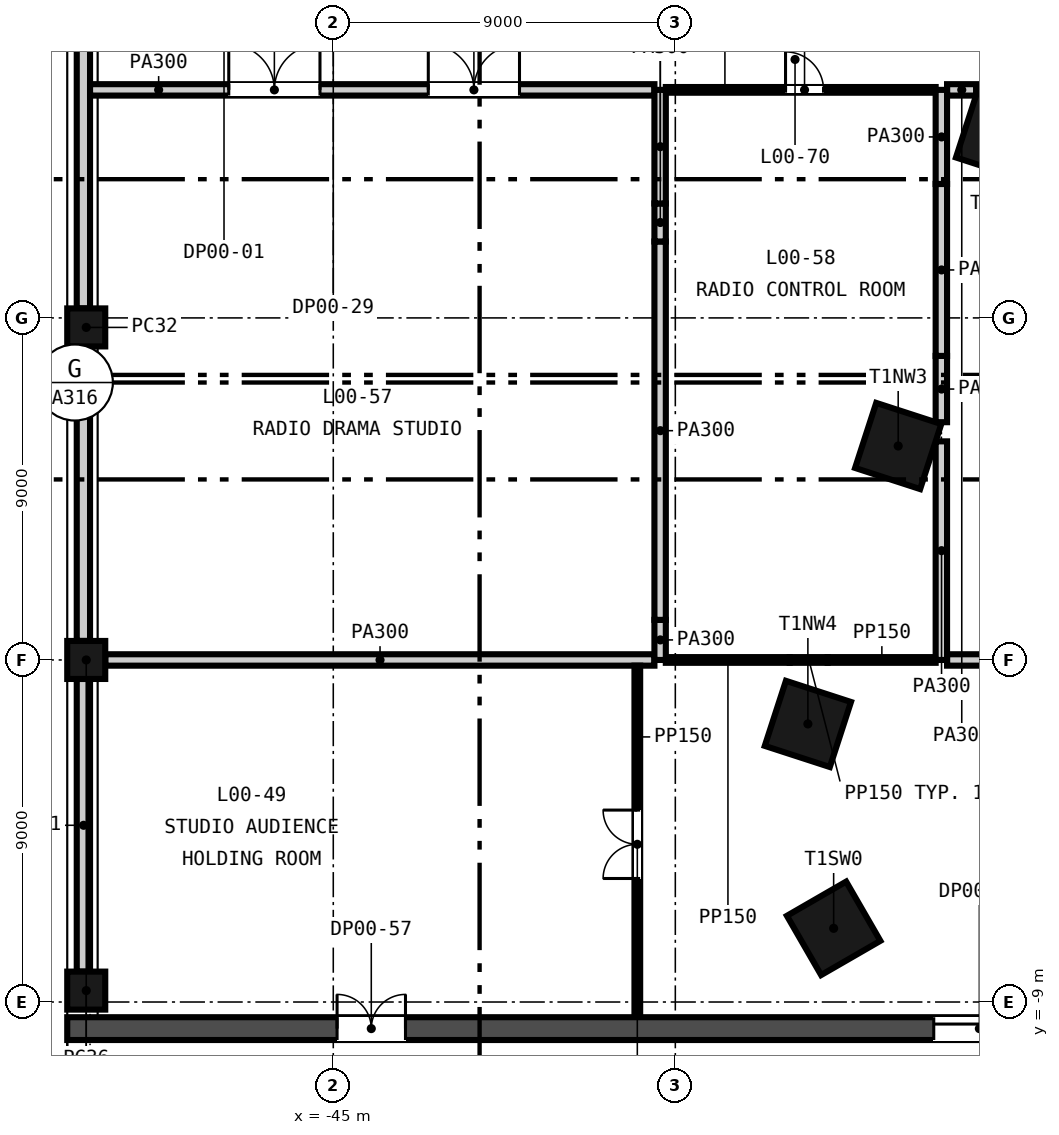
"""IFC4 building model, lengths in metres.
Left out: names, types, materials, properties, quantities, classifications, styles, units other than length and angle.
Written with IfcOpenShell. Run it as: python <this file> out.ifc"""

import sys

from ifc_helpers import new_model, si_unit, direction, frame, frame_2d, origin, origin_2d, place, context, subcontext, project, spatial, rectangle, extrude, element, fill, save


model = new_model("IFC4")
c1 = context("Model", 3, precision=1e-05, world=origin(), true_north=direction((0.0, 1.0)))
c2 = subcontext(c1, "Body", "Model", "MODEL_VIEW")
j1 = project(units=[si_unit("LENGTHUNIT", "METRE"), si_unit("PLANEANGLEUNIT", "RADIAN")], contexts=[c1])
p1 = place(None, origin())
s1 = spatial("IfcSite", under=j1, at=p1, CompositionType="ELEMENT")
p2 = place(p1, origin())
s2 = spatial("IfcBuilding", under=s1, at=p2, CompositionType="ELEMENT")
p3 = place(p2, origin())
s3 = spatial("IfcBuildingStorey", under=s2, at=p3, CompositionType="ELEMENT", Elevation=0.0)
for number, where, z_axis, x_axis in (
    (1, (-27.482, 13.799, -0.3), (0.0, 0.0, 1.0), (-0.309, -0.951, 0.0)),
    (2, (-30.136, 5.63, -0.3), (0.0, 0.0, 1.0), (-0.309, -0.951, 0.0)),
    (3, (-32.512, -1.683, -0.3), (0.0, 0.0, 1.0), (-0.309, -0.951, 0.0)),
    (4, (-31.834, -7.061, -0.3), (0.0, 0.0, 1.0), (0.5, -0.866, 0.0)),
):
    element("IfcColumn", number, at=place(p3, frame(where, z_axis=z_axis, x_axis=x_axis)), inside=s3, PredefinedType="COLUMN", context=c2, shape_type="SweptSolid", body=[
        extrude(rectangle(XDim=1.8, YDim=1.8, at=origin_2d()), origin(), (0.0, 0.0, 1.0), 8.9),
    ])
for number, where, z_axis, x_axis in (
    (5, (-51.5, 8.75, -0.3), (0.0, 0.0, 1.0), (0.0, -1.0, 0.0)),
    (6, (-51.5, 0.0, -0.3), (0.0, 0.0, 1.0), (0.0, -1.0, 0.0)),
    (7, (-51.5, -8.7, -0.3), (0.0, 0.0, 1.0), (0.0, 1.0, 0.0)),
):
    element("IfcColumn", number, at=place(p3, frame(where, z_axis=z_axis, x_axis=x_axis)), inside=s3, PredefinedType="COLUMN", context=c2, shape_type="SweptSolid", body=[
        extrude(rectangle(XDim=1.0, YDim=1.0, at=origin_2d()), origin(), (0.0, 0.0, 1.0), 8.9),
    ])
p4 = place(p3, frame((-52.0, -9.7, -0.3), z_axis=(0.0, 0.0, 1.0), x_axis=(1.0, 0.0, 0.0)))
e8 = element("IfcWall", 8, at=p4, inside=s3, PredefinedType="SOLIDWALL", context=c2, shape_type="SweptSolid", body=[
    extrude(rectangle(XDim=104.0, YDim=0.6, at=frame_2d((52.0, 0.0))), origin(), (0.0, 0.0, 1.0), 8.9),
])
p5 = place(p4, frame((67.4, 0.0, 0.3)))
e9 = element("IfcOpeningElement", 9, at=p5, cuts=e8, PredefinedType="OPENING", context=c2, shape_type="SweptSolid", body=[
    extrude(rectangle(XDim=1.2, YDim=2.1, at=frame_2d((0.6, 1.05))), frame((0.0, 0.31, 0.0), z_axis=(0.0, -1.0, 0.0), x_axis=(1.0, 0.0, 0.0)), (0.0, 0.0, 1.0), 0.62),
])
p6 = place(p4, frame((38.2, 0.0, 0.3)))
e10 = element("IfcOpeningElement", 10, at=p6, cuts=e8, PredefinedType="OPENING", context=c2, shape_type="SweptSolid", body=[
    extrude(rectangle(XDim=1.8, YDim=2.4, at=frame_2d((0.9, 1.2))), frame((0.0, 0.31, 0.0), z_axis=(0.0, -1.0, 0.0), x_axis=(1.0, 0.0, 0.0)), (0.0, 0.0, 1.0), 0.62),
])
p7 = place(p4, frame((64.0, 0.0, 0.3)))
e11 = element("IfcOpeningElement", 11, at=p7, cuts=e8, PredefinedType="OPENING", context=c2, shape_type="SweptSolid", body=[
    extrude(rectangle(XDim=1.8, YDim=2.4, at=frame_2d((0.9, 1.2))), frame((0.0, 0.31, 0.0), z_axis=(0.0, -1.0, 0.0), x_axis=(1.0, 0.0, 0.0)), (0.0, 0.0, 1.0), 0.62),
])
p8 = place(p4, frame((41.8, 0.0, 0.3)))
e12 = element("IfcOpeningElement", 12, at=p8, cuts=e8, PredefinedType="OPENING", context=c2, shape_type="SweptSolid", body=[
    extrude(rectangle(XDim=2.4, YDim=2.4, at=frame_2d((1.2, 1.2))), frame((0.0, 0.31, 0.0), z_axis=(0.0, -1.0, 0.0), x_axis=(1.0, 0.0, 0.0)), (0.0, 0.0, 1.0), 0.62),
])
p9 = place(p4, frame((59.8, 0.0, 0.3)))
e13 = element("IfcOpeningElement", 13, at=p9, cuts=e8, PredefinedType="OPENING", context=c2, shape_type="SweptSolid", body=[
    extrude(rectangle(XDim=2.4, YDim=2.4, at=frame_2d((1.2, 1.2))), frame((0.0, 0.31, 0.0), z_axis=(0.0, -1.0, 0.0), x_axis=(1.0, 0.0, 0.0)), (0.0, 0.0, 1.0), 0.62),
])
p10 = place(p4, frame((22.8, 0.0, 0.3)))
e14 = element("IfcOpeningElement", 14, at=p10, cuts=e8, PredefinedType="OPENING", context=c2, shape_type="SweptSolid", body=[
    extrude(rectangle(XDim=2.4, YDim=2.4, at=frame_2d((1.2, 1.2))), frame((0.0, 0.31, 0.0), z_axis=(0.0, -1.0, 0.0), x_axis=(1.0, 0.0, 0.0)), (0.0, 0.0, 1.0), 0.62),
])
p11 = place(p4, frame((78.8, 0.0, 0.3)))
e15 = element("IfcOpeningElement", 15, at=p11, cuts=e8, PredefinedType="OPENING", context=c2, shape_type="SweptSolid", body=[
    extrude(rectangle(XDim=2.4, YDim=2.4, at=frame_2d((1.2, 1.2))), frame((0.0, 0.31, 0.0), z_axis=(0.0, -1.0, 0.0), x_axis=(1.0, 0.0, 0.0)), (0.0, 0.0, 1.0), 0.62),
])
p12 = place(p4, frame((7.1, 0.0, 0.3)))
e16 = element("IfcOpeningElement", 16, at=p12, cuts=e8, PredefinedType="OPENING", context=c2, shape_type="SweptSolid", body=[
    extrude(rectangle(XDim=1.8, YDim=2.4, at=frame_2d((0.9, 1.2))), frame((0.0, 0.31, 0.0), z_axis=(0.0, -1.0, 0.0), x_axis=(1.0, 0.0, 0.0)), (0.0, 0.0, 1.0), 0.62),
])
p13 = place(p4, frame((95.1, 0.0, 0.3)))
e17 = element("IfcOpeningElement", 17, at=p13, cuts=e8, PredefinedType="OPENING", context=c2, shape_type="SweptSolid", body=[
    extrude(rectangle(XDim=1.8, YDim=2.4, at=frame_2d((0.9, 1.2))), frame((0.0, 0.31, 0.0), z_axis=(0.0, -1.0, 0.0), x_axis=(1.0, 0.0, 0.0)), (0.0, 0.0, 1.0), 0.62),
])
for number, where, z_axis, x_axis in (
    (18, (-51.575, 17.0, -0.3), (0.0, 0.0, 1.0), (0.0, -1.0, 0.0)),
    (19, (-51.575, 8.25, -0.3), (0.0, 0.0, 1.0), (0.0, -1.0, 0.0)),
):
    element("IfcWall", number, at=place(p3, frame(where, z_axis=z_axis, x_axis=x_axis)), inside=s3, PredefinedType="SOLIDWALL", context=c2, shape_type="SweptSolid", body=[
        extrude(rectangle(XDim=7.75, YDim=0.35, at=frame_2d((3.875, 0.0))), origin(), (0.0, 0.0, 1.0), 8.0),
    ])
p14 = place(p3, frame((-51.575, -0.5, -0.3), z_axis=(0.0, 0.0, 1.0), x_axis=(0.0, -1.0, 0.0)))
e20 = element("IfcWall", 20, at=p14, inside=s3, PredefinedType="SOLIDWALL", context=c2, shape_type="SweptSolid", body=[
    extrude(rectangle(XDim=7.7, YDim=0.35, at=frame_2d((3.85, 0.0))), origin(), (0.0, 0.0, 1.0), 8.0),
])
p15 = place(p3, frame((-51.0, 0.0, 0.0), z_axis=(0.0, 0.0, 1.0), x_axis=(1.0, 0.0, 0.0)))
e21 = element("IfcWall", 21, at=p15, inside=s3, PredefinedType="PARTITIONING", context=c2, shape_type="SweptSolid", body=[
    extrude(rectangle(XDim=14.45, YDim=0.3, at=frame_2d((7.225, 0.0))), origin(), (0.0, 0.0, 1.0), 8.6),
])
p16 = place(p3, frame((-36.25, 0.0, 0.0), z_axis=(0.0, 0.0, 1.0), x_axis=(1.0, 0.0, 0.0)))
e22 = element("IfcWall", 22, at=p16, inside=s3, PredefinedType="PARTITIONING", context=c2, shape_type="SweptSolid", body=[
    extrude(rectangle(XDim=3.259, YDim=0.15, at=frame_2d((1.629, 0.0))), origin(), (0.0, 0.0, 1.0), 8.6),
])
p17 = place(p3, frame((-32.991, 0.0, 0.0), z_axis=(0.0, 0.0, 1.0), x_axis=(1.0, 0.0, 0.0)))
e23 = element("IfcWall", 23, at=p17, inside=s3, PredefinedType="PARTITIONING", context=c2, shape_type="SweptSolid", body=[
    extrude(rectangle(XDim=1.0, YDim=0.15, at=frame_2d((0.5, 0.0))), origin(), (0.0, 0.0, 1.0), 7.6),
])
p18 = place(p3, frame((-31.991, 0.0, 0.0), z_axis=(0.0, 0.0, 1.0), x_axis=(1.0, 0.0, 0.0)))
e24 = element("IfcWall", 24, at=p18, inside=s3, PredefinedType="PARTITIONING", context=c2, shape_type="SweptSolid", body=[
    extrude(rectangle(XDim=2.841, YDim=0.15, at=frame_2d((1.42, 0.0))), origin(), (0.0, 0.0, 1.0), 8.6),
])
p19 = place(p3, frame((-28.85, 0.0, 0.0), z_axis=(0.0, 0.0, 1.0), x_axis=(1.0, 0.0, 0.0)))
e25 = element("IfcWall", 25, at=p19, inside=s3, PredefinedType="PARTITIONING", context=c2, shape_type="SweptSolid", body=[
    extrude(rectangle(XDim=4.35, YDim=0.3, at=frame_2d((2.175, 0.0))), origin(), (0.0, 0.0, 1.0), 8.6),
])
p20 = place(p3, frame((-51.4, 15.0, 0.0), z_axis=(0.0, 0.0, 1.0), x_axis=(1.0, 0.0, 0.0)))
e26 = element("IfcWall", 26, at=p20, inside=s3, PredefinedType="PARTITIONING", context=c2, shape_type="SweptSolid", body=[
    extrude(rectangle(XDim=14.85, YDim=0.3, at=frame_2d((7.425, 0.0))), origin(), (0.0, 0.0, 1.0), 8.6),
])
p21 = place(p20, frame((3.65, 0.0, 0.0)))
e27 = element("IfcOpeningElement", 27, at=p21, cuts=e26, PredefinedType="OPENING", context=c2, shape_type="SweptSolid", body=[
    extrude(rectangle(XDim=2.4, YDim=2.4, at=frame_2d((1.2, 1.2))), frame((0.0, 0.16, 0.0), z_axis=(0.0, -1.0, 0.0), x_axis=(1.0, 0.0, 0.0)), (0.0, 0.0, 1.0), 0.32),
])
p22 = place(p20, frame((8.9, 0.0, 0.0)))
e28 = element("IfcOpeningElement", 28, at=p22, cuts=e26, PredefinedType="OPENING", context=c2, shape_type="SweptSolid", body=[
    extrude(rectangle(XDim=2.4, YDim=2.4, at=frame_2d((1.2, 1.2))), frame((0.0, 0.16, 0.0), z_axis=(0.0, -1.0, 0.0), x_axis=(1.0, 0.0, 0.0)), (0.0, 0.0, 1.0), 0.32),
])
p23 = place(p3, frame((-36.25, 15.0, 0.0), z_axis=(0.0, 0.0, 1.0), x_axis=(1.0, 0.0, 0.0)))
e29 = element("IfcWall", 29, at=p23, inside=s3, PredefinedType="PARTITIONING", context=c2, shape_type="SweptSolid", body=[
    extrude(rectangle(XDim=7.1, YDim=0.15, at=frame_2d((3.55, 0.0))), origin(), (0.0, 0.0, 1.0), 8.6),
])
p24 = place(p23, frame((3.15, 0.0, 0.0)))
e30 = element("IfcOpeningElement", 30, at=p24, cuts=e29, PredefinedType="OPENING", context=c2, shape_type="SweptSolid", body=[
    extrude(rectangle(XDim=1.0, YDim=2.1, at=frame_2d((0.5, 1.05))), frame((0.0, 0.085, 0.0), z_axis=(0.0, -1.0, 0.0), x_axis=(1.0, 0.0, 0.0)), (0.0, 0.0, 1.0), 0.17),
])
p25 = place(p3, frame((-28.85, 15.0, 0.0), z_axis=(0.0, 0.0, 1.0), x_axis=(1.0, 0.0, 0.0)))
e31 = element("IfcWall", 31, at=p25, inside=s3, PredefinedType="PARTITIONING", context=c2, shape_type="SweptSolid", body=[
    extrude(rectangle(XDim=0.764, YDim=0.3, at=frame_2d((0.382, 0.0))), origin(), (0.0, 0.0, 1.0), 8.6),
])
p26 = place(p3, frame((-37.0, -9.4, 0.0), z_axis=(0.0, 0.0, 1.0), x_axis=(0.0, 1.0, 0.0)))
e32 = element("IfcWall", 32, at=p26, inside=s3, PredefinedType="PARTITIONING", context=c2, shape_type="SweptSolid", body=[
    extrude(rectangle(XDim=9.25, YDim=0.15, at=frame_2d((4.625, 0.0))), origin(), (0.0, 0.0, 1.0), 8.6),
])
p27 = place(p26, frame((3.65, 0.0, 0.0)))
e33 = element("IfcOpeningElement", 33, at=p27, cuts=e32, PredefinedType="OPENING", context=c2, shape_type="SweptSolid", body=[
    extrude(rectangle(XDim=1.8, YDim=2.4, at=frame_2d((0.9, 1.2))), frame((0.0, 0.085, 0.0), z_axis=(0.0, -1.0, 0.0), x_axis=(1.0, 0.0, 0.0)), (0.0, 0.0, 1.0), 0.17),
])
p28 = place(p3, frame((-36.4, 0.0, 0.0), z_axis=(0.0, 0.0, 1.0), x_axis=(0.0, 1.0, 0.0)))
e34 = element("IfcWall", 34, at=p28, inside=s3, PredefinedType="PARTITIONING", context=c2, shape_type="SweptSolid", body=[
    extrude(rectangle(XDim=1.055, YDim=0.3, at=frame_2d((0.527, 0.0))), origin(), (0.0, 0.0, 1.0), 7.698),
])
p29 = place(p3, frame((-36.4, 1.055, 0.0), z_axis=(0.0, 0.0, 1.0), x_axis=(0.0, 1.0, 0.0)))
e35 = element("IfcWall", 35, at=p29, inside=s3, PredefinedType="PARTITIONING", context=c2, shape_type="SweptSolid", body=[
    extrude(rectangle(XDim=9.956, YDim=0.3, at=frame_2d((4.978, 0.0))), origin(), (0.0, 0.0, 1.0), 8.6),
])
p30 = place(p3, frame((-36.4, 11.011, 0.0), z_axis=(0.0, 0.0, 1.0), x_axis=(0.0, 1.0, 0.0)))
e36 = element("IfcWall", 36, at=p30, inside=s3, PredefinedType="PARTITIONING", context=c2, shape_type="SweptSolid", body=[
    extrude(rectangle(XDim=1.0, YDim=0.3, at=frame_2d((0.5, 0.0))), origin(), (0.0, 0.0, 1.0), 7.619),
])
p31 = place(p3, frame((-36.4, 12.011, 0.0), z_axis=(0.0, 0.0, 1.0), x_axis=(0.0, 1.0, 0.0)))
e37 = element("IfcWall", 37, at=p31, inside=s3, PredefinedType="PARTITIONING", context=c2, shape_type="SweptSolid", body=[
    extrude(rectangle(XDim=2.989, YDim=0.3, at=frame_2d((1.495, 0.0))), origin(), (0.0, 0.0, 1.0), 8.6),
])
p32 = place(p3, frame((-29.0, 0.0, 0.0), z_axis=(0.0, 0.0, 1.0), x_axis=(0.0, 1.0, 0.0)))
e38 = element("IfcWall", 38, at=p32, inside=s3, PredefinedType="PARTITIONING", context=c2, shape_type="SweptSolid", body=[
    extrude(rectangle(XDim=5.752, YDim=0.3, at=frame_2d((2.876, 0.0))), origin(), (0.0, 0.0, 1.0), 8.6),
])
p33 = place(p3, frame((-29.0, 6.256, 0.0), z_axis=(0.0, 0.0, 1.0), x_axis=(0.0, 1.0, 0.0)))
e39 = element("IfcWall", 39, at=p33, inside=s3, PredefinedType="PARTITIONING", context=c2, shape_type="SweptSolid", body=[
    extrude(rectangle(XDim=1.744, YDim=0.3, at=frame_2d((0.872, 0.0))), origin(), (0.0, 0.0, 1.0), 8.067),
])
p34 = place(p3, frame((-29.0, 8.0, 0.0), z_axis=(0.0, 0.0, 1.0), x_axis=(0.0, 1.0, 0.0)))
e40 = element("IfcWall", 40, at=p34, inside=s3, PredefinedType="PARTITIONING", context=c2, shape_type="SweptSolid", body=[
    extrude(rectangle(XDim=4.524, YDim=0.3, at=frame_2d((2.262, 0.0))), origin(), (0.0, 0.0, 1.0), 7.6),
])
p35 = place(p3, frame((-29.0, 12.524, 0.0), z_axis=(0.0, 0.0, 1.0), x_axis=(0.0, 1.0, 0.0)))
e41 = element("IfcWall", 41, at=p35, inside=s3, PredefinedType="PARTITIONING", context=c2, shape_type="SweptSolid", body=[
    extrude(rectangle(XDim=2.476, YDim=0.3, at=frame_2d((1.238, 0.0))), origin(), (0.0, 0.0, 1.0), 8.6),
])
p36 = place(p27, origin())
e42 = element("IfcDoor", 42, at=p36, inside=s3, OperationType="SINGLE_SWING_LEFT", PredefinedType="DOOR", context=c2, shape_type="SweptSolid", body=[
    extrude(rectangle(XDim=1.8, YDim=2.4, at=frame_2d((0.9, 1.2))), frame((0.0, 0.025, 0.0), z_axis=(0.0, -1.0, 0.0), x_axis=(1.0, 0.0, 0.0)), (0.0, 0.0, 1.0), 0.05),
])
fill(e33, e42)
p37 = place(p21, origin())
e43 = element("IfcDoor", 43, at=p37, inside=s3, OperationType="SINGLE_SWING_LEFT", PredefinedType="DOOR", context=c2, shape_type="SweptSolid", body=[
    extrude(rectangle(XDim=2.4, YDim=2.4, at=frame_2d((1.2, 1.2))), frame((0.0, 0.025, 0.0), z_axis=(0.0, -1.0, 0.0), x_axis=(1.0, 0.0, 0.0)), (0.0, 0.0, 1.0), 0.05),
])
fill(e27, e43)
p38 = place(p22, origin())
e44 = element("IfcDoor", 44, at=p38, inside=s3, OperationType="SINGLE_SWING_LEFT", PredefinedType="DOOR", context=c2, shape_type="SweptSolid", body=[
    extrude(rectangle(XDim=2.4, YDim=2.4, at=frame_2d((1.2, 1.2))), frame((0.0, 0.025, 0.0), z_axis=(0.0, -1.0, 0.0), x_axis=(1.0, 0.0, 0.0)), (0.0, 0.0, 1.0), 0.05),
])
fill(e28, e44)
p39 = place(p24, origin())
e45 = element("IfcDoor", 45, at=p39, inside=s3, OperationType="SINGLE_SWING_LEFT", PredefinedType="DOOR", context=c2, shape_type="SweptSolid", body=[
    extrude(rectangle(XDim=1.0, YDim=2.1, at=frame_2d((0.5, 1.05))), frame((0.0, 0.025, 0.0), z_axis=(0.0, -1.0, 0.0), x_axis=(1.0, 0.0, 0.0)), (0.0, 0.0, 1.0), 0.05),
])
fill(e30, e45)
p40 = place(p10, frame((2.4, 0.0, 0.0), z_axis=(0.0, 0.0, 1.0), x_axis=(-1.0, 0.0, 0.0)))
e46 = element("IfcDoor", 46, at=p40, inside=s3, OperationType="SINGLE_SWING_LEFT", PredefinedType="DOOR", context=c2, shape_type="SweptSolid", body=[
    extrude(rectangle(XDim=2.4, YDim=2.4, at=frame_2d((1.2, 1.2))), frame((0.0, 0.025, 0.0), z_axis=(0.0, -1.0, 0.0), x_axis=(1.0, 0.0, 0.0)), (0.0, 0.0, 1.0), 0.05),
])
fill(e14, e46)
p41 = place(p12, frame((1.8, 0.0, 0.0), z_axis=(0.0, 0.0, 1.0), x_axis=(-1.0, 0.0, 0.0)))
e47 = element("IfcDoor", 47, at=p41, inside=s3, OperationType="SINGLE_SWING_LEFT", PredefinedType="DOOR", context=c2, shape_type="SweptSolid", body=[
    extrude(rectangle(XDim=1.8, YDim=2.4, at=frame_2d((0.9, 1.2))), frame((0.0, 0.025, 0.0), z_axis=(0.0, -1.0, 0.0), x_axis=(1.0, 0.0, 0.0)), (0.0, 0.0, 1.0), 0.05),
])
fill(e16, e47)
save(model, sys.argv[1])
